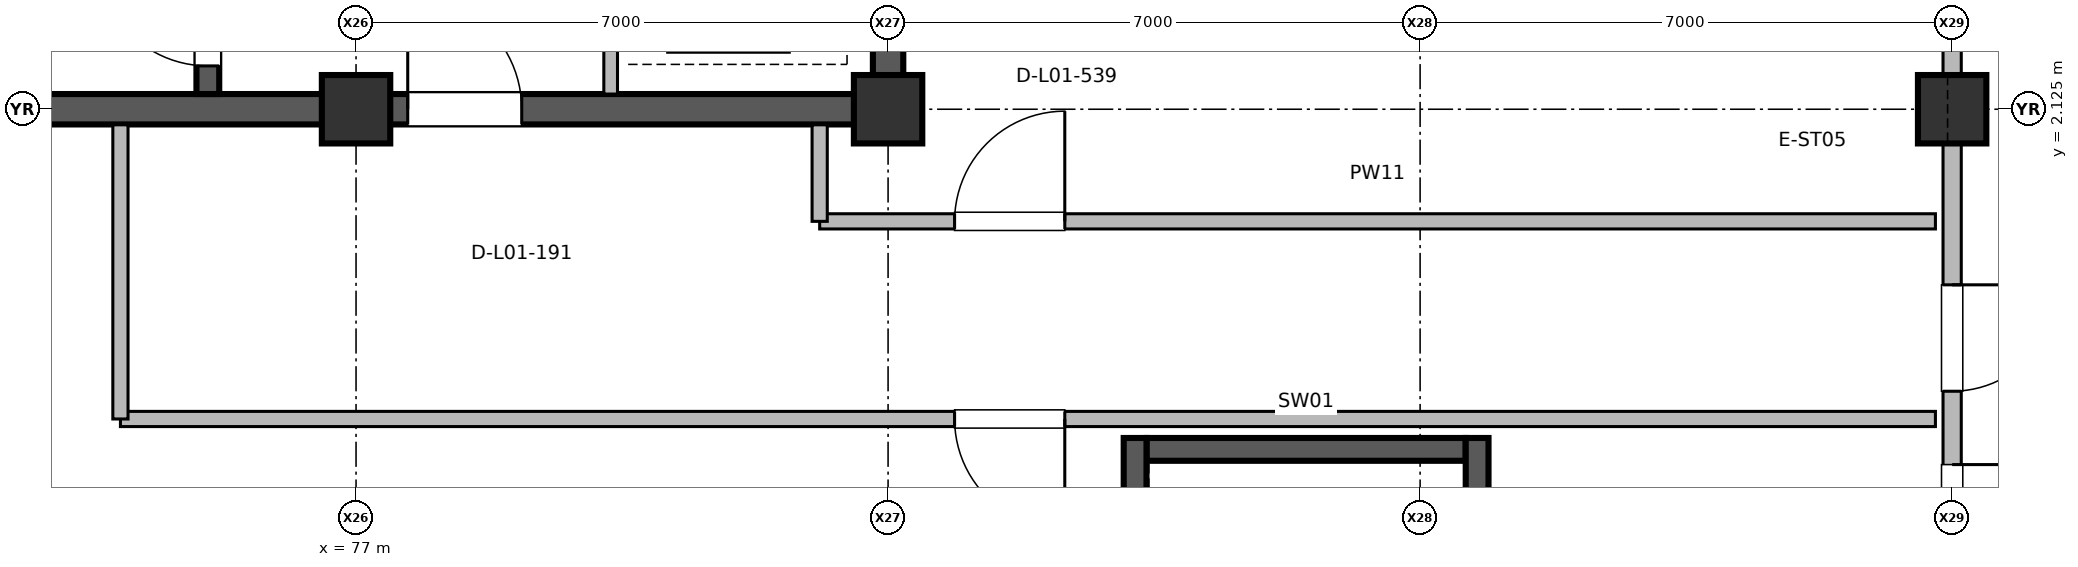
"""IFC4 building model, lengths in metres.
Left out: names, types, materials, properties, quantities, classifications, styles, units other than length and angle.
Written with IfcOpenShell. Run it as: python <this file> out.ifc"""

import sys

from ifc_helpers import new_model, si_unit, direction, frame, frame_2d, origin, origin_2d, place, context, subcontext, project, spatial, rectangle, circle, extrude, element, fill, save


model = new_model("IFC4")
c1 = context("Model", 3, precision=1e-05, world=origin(), true_north=direction((0.0, 1.0)))
c2 = subcontext(c1, "Body", "Model", "MODEL_VIEW")
j1 = project(units=[si_unit("LENGTHUNIT", "METRE"), si_unit("PLANEANGLEUNIT", "RADIAN")], contexts=[c1])
p1 = place(None, origin())
s1 = spatial("IfcSite", under=j1, at=p1, CompositionType="ELEMENT")
p2 = place(p1, origin())
s2 = spatial("IfcBuilding", under=s1, at=p2, CompositionType="ELEMENT")
p3 = place(p2, origin())
s3 = spatial("IfcBuildingStorey", under=s2, at=p3, CompositionType="ELEMENT", Elevation=0.0)
for number, where, z_axis, x_axis in (
    (1, (77.0, 2.125, 0.0), (0.0, 0.0, 1.0), (1.0, 0.0, 0.0)),
    (2, (84.0, 2.125, 0.0), (0.0, 0.0, 1.0), (1.0, 0.0, 0.0)),
):
    element("IfcColumn", number, at=place(p3, frame(where, z_axis=z_axis, x_axis=x_axis)), inside=s3, PredefinedType="COLUMN", context=c2, shape_type="SweptSolid", body=[
        extrude(rectangle(XDim=0.9, YDim=0.9, at=origin_2d()), origin(), (0.0, 0.0, 1.0), 5.998),
    ])
p4 = place(p3, frame((98.0, 2.125, 0.0), z_axis=(0.0, 0.0, 1.0), x_axis=(1.0, 0.0, 0.0)))
e3 = element("IfcColumn", 3, at=p4, inside=s3, PredefinedType="COLUMN", context=c2, shape_type="SweptSolid", body=[
    extrude(circle(Radius=0.45, at=origin_2d()), origin(), (0.0, 0.0, 1.0), 5.998),
])
p5 = place(p3, frame((84.0, 2.325, 0.0), z_axis=(0.0, 0.0, 1.0), x_axis=(0.0, 1.0, 0.0)))
e4 = element("IfcWall", 4, at=p5, inside=s3, PredefinedType="SHEAR", context=c2, shape_type="SweptSolid", body=[
    extrude(rectangle(XDim=13.35, YDim=0.4, at=frame_2d((6.675, 0.0))), origin(), (0.0, 0.0, 1.0), 5.75),
])
p6 = place(p3, frame((70.2, 2.125, 0.0), z_axis=(0.0, 0.0, 1.0), x_axis=(1.0, 0.0, 0.0)))
e5 = element("IfcWall", 5, at=p6, inside=s3, PredefinedType="SHEAR", context=c2, shape_type="SweptSolid", body=[
    extrude(rectangle(XDim=13.6, YDim=0.4, at=frame_2d((6.8, 0.0))), origin(), (0.0, 0.0, 1.0), 5.75),
])
p7 = place(p6, frame((7.48, 0.0, 0.0)))
e6 = element("IfcOpeningElement", 6, at=p7, cuts=e5, PredefinedType="OPENING", context=c2, shape_type="SweptSolid", body=[
    extrude(rectangle(XDim=1.5, YDim=2.2, at=frame_2d((0.75, 1.1))), frame((0.0, 0.21, 0.0), z_axis=(0.0, -1.0, 0.0), x_axis=(1.0, 0.0, 0.0)), (0.0, 0.0, 1.0), 0.42),
])
p8 = place(p3, frame((98.0, 1.685, 0.0), z_axis=(0.0, 0.0, 1.0), x_axis=(0.0, -1.0, 0.0)))
e7 = element("IfcWall", 7, at=p8, inside=s3, PredefinedType="SOLIDWALL", context=c2, shape_type="SweptSolid", body=[
    extrude(rectangle(XDim=12.87, YDim=0.24, at=frame_2d((6.435, 0.0))), origin(), (0.0, 0.0, 1.0), 4.625),
])
p9 = place(p8, frame((4.235, 0.0, 0.0)))
e8 = element("IfcOpeningElement", 8, at=p9, cuts=e7, PredefinedType="OPENING", context=c2, shape_type="SweptSolid", body=[
    extrude(rectangle(XDim=4.4, YDim=2.8, at=frame_2d((2.2, 1.4))), frame((0.0, 0.13, 0.0), z_axis=(0.0, -1.0, 0.0), x_axis=(1.0, 0.0, 0.0)), (0.0, 0.0, 1.0), 0.26),
])
p10 = place(p8, frame((1.87, 0.0, 0.0)))
e9 = element("IfcOpeningElement", 9, at=p10, cuts=e7, PredefinedType="OPENING", context=c2, shape_type="SweptSolid", body=[
    extrude(rectangle(XDim=1.4, YDim=2.2, at=frame_2d((0.7, 1.1))), frame((0.0, 0.13, 0.0), z_axis=(0.0, -1.0, 0.0), x_axis=(1.0, 0.0, 0.0)), (0.0, 0.0, 1.0), 0.26),
])
p11 = place(p8, frame((9.12, 0.0, 1.0)))
e10 = element("IfcOpeningElement", 10, at=p11, cuts=e7, PredefinedType="OPENING", context=c2, shape_type="SweptSolid", body=[
    extrude(rectangle(XDim=3.0, YDim=2.15, at=frame_2d((1.5, 1.075))), frame((0.0, 0.13, 0.0), z_axis=(0.0, -1.0, 0.0), x_axis=(1.0, 0.0, 0.0)), (0.0, 0.0, 1.0), 0.26),
])
p12 = place(p3, frame((98.0, 15.435, 0.0), z_axis=(0.0, 0.0, 1.0), x_axis=(0.0, -1.0, 0.0)))
e11 = element("IfcWall", 11, at=p12, inside=s3, PredefinedType="SOLIDWALL", context=c2, shape_type="SweptSolid", body=[
    extrude(rectangle(XDim=12.87, YDim=0.24, at=frame_2d((6.435, 0.0))), origin(), (0.0, 0.0, 1.0), 4.625),
])
p13 = place(p12, frame((4.635, 0.0, 0.0)))
e12 = element("IfcOpeningElement", 12, at=p13, cuts=e11, PredefinedType="OPENING", context=c2, shape_type="SweptSolid", body=[
    extrude(rectangle(XDim=3.6, YDim=2.75, at=frame_2d((1.8, 1.375))), frame((0.0, 0.13, 0.0), z_axis=(0.0, -1.0, 0.0), x_axis=(1.0, 0.0, 0.0)), (0.0, 0.0, 1.0), 0.26),
])
p14 = place(p12, frame((0.75, 0.0, 1.0)))
e13 = element("IfcOpeningElement", 13, at=p14, cuts=e11, PredefinedType="OPENING", context=c2, shape_type="SweptSolid", body=[
    extrude(rectangle(XDim=1.7, YDim=1.85, at=frame_2d((0.85, 0.925))), frame((0.0, 0.13, 0.0), z_axis=(0.0, -1.0, 0.0), x_axis=(1.0, 0.0, 0.0)), (0.0, 0.0, 1.0), 0.26),
])
p15 = place(p12, frame((10.42, 0.0, 1.0)))
e14 = element("IfcOpeningElement", 14, at=p15, cuts=e11, PredefinedType="OPENING", context=c2, shape_type="SweptSolid", body=[
    extrude(rectangle(XDim=1.7, YDim=1.85, at=frame_2d((0.85, 0.925))), frame((0.0, 0.13, 0.0), z_axis=(0.0, -1.0, 0.0), x_axis=(1.0, 0.0, 0.0)), (0.0, 0.0, 1.0), 0.26),
])
p16 = place(p3, frame((75.05, 2.325, 0.0), z_axis=(0.0, 0.0, 1.0), x_axis=(0.0, 1.0, 0.0)))
e15 = element("IfcWall", 15, at=p16, inside=s3, PredefinedType="SHEAR", context=c2, shape_type="SweptSolid", body=[
    extrude(rectangle(XDim=8.7, YDim=0.3, at=frame_2d((4.35, 0.0))), origin(), (0.0, 0.0, 1.0), 5.75),
])
p17 = place(p16, frame((0.37, 0.0, 0.0)))
e16 = element("IfcOpeningElement", 16, at=p17, cuts=e15, PredefinedType="OPENING", context=c2, shape_type="SweptSolid", body=[
    extrude(rectangle(XDim=1.45, YDim=2.2, at=frame_2d((0.725, 1.1))), frame((0.0, 0.16, 0.0), z_axis=(0.0, -1.0, 0.0), x_axis=(1.0, 0.0, 0.0)), (0.0, 0.0, 1.0), 0.32),
])
p18 = place(p3, frame((80.35, 2.325, 0.0), z_axis=(0.0, 0.0, 1.0), x_axis=(0.0, 1.0, 0.0)))
e17 = element("IfcWall", 17, at=p18, inside=s3, PredefinedType="PARTITIONING", context=c2, shape_type="SweptSolid", body=[
    extrude(rectangle(XDim=7.08, YDim=0.18, at=frame_2d((3.54, 0.0))), origin(), (0.0, 0.0, 1.0), 5.02),
])
p19 = place(p18, frame((1.0, 0.0, 0.0)))
e18 = element("IfcOpeningElement", 18, at=p19, cuts=e17, PredefinedType="OPENING", context=c2, shape_type="SweptSolid", body=[
    extrude(rectangle(XDim=1.1, YDim=2.2, at=frame_2d((0.55, 1.1))), frame((0.0, 0.1, 0.0), z_axis=(0.0, -1.0, 0.0), x_axis=(1.0, 0.0, 0.0)), (0.0, 0.0, 1.0), 0.2),
])
p20 = place(p18, frame((2.85, 0.0, 0.0)))
e19 = element("IfcOpeningElement", 19, at=p20, cuts=e17, PredefinedType="OPENING", context=c2, shape_type="SweptSolid", body=[
    extrude(rectangle(XDim=1.2, YDim=2.25, at=frame_2d((0.6, 1.125))), frame((0.0, 0.1, 0.0), z_axis=(0.0, -1.0, 0.0), x_axis=(1.0, 0.0, 0.0)), (0.0, 0.0, 1.0), 0.2),
])
p21 = place(p18, frame((4.8, 0.0, 0.0)))
e20 = element("IfcOpeningElement", 20, at=p21, cuts=e17, PredefinedType="OPENING", context=c2, shape_type="SweptSolid", body=[
    extrude(rectangle(XDim=1.4, YDim=2.3, at=frame_2d((0.7, 1.15))), frame((0.0, 0.1, 0.0), z_axis=(0.0, -1.0, 0.0), x_axis=(1.0, 0.0, 0.0)), (0.0, 0.0, 1.0), 0.2),
])
p22 = place(p3, frame((97.78, -1.95, 0.0), z_axis=(0.0, 0.0, 1.0), x_axis=(-1.0, 0.0, 0.0)))
e21 = element("IfcWall", 21, at=p22, inside=s3, PredefinedType="PARTITIONING", context=c2, shape_type="SweptSolid", body=[
    extrude(rectangle(XDim=23.88, YDim=0.2, at=frame_2d((11.94, 0.0))), origin(), (0.0, 0.0, 1.0), 4.525),
])
p23 = place(p22, frame((11.455, 0.0, 0.0)))
e22 = element("IfcOpeningElement", 22, at=p23, cuts=e21, PredefinedType="OPENING", context=c2, shape_type="SweptSolid", body=[
    extrude(rectangle(XDim=1.45, YDim=2.2, at=frame_2d((0.725, 1.1))), frame((0.0, 0.11, 0.0), z_axis=(0.0, -1.0, 0.0), x_axis=(1.0, 0.0, 0.0)), (0.0, 0.0, 1.0), 0.22),
])
p24 = place(p3, frame((83.1, 0.65, 0.0), z_axis=(0.0, 0.0, 1.0), x_axis=(1.0, 0.0, 0.0)))
e23 = element("IfcWall", 23, at=p24, inside=s3, PredefinedType="PARTITIONING", context=c2, shape_type="SweptSolid", body=[
    extrude(rectangle(XDim=14.68, YDim=0.2, at=frame_2d((7.34, 0.0))), origin(), (0.0, 0.0, 1.0), 5.02),
])
p25 = place(p24, frame((1.775, 0.0, 0.0)))
e24 = element("IfcOpeningElement", 24, at=p25, cuts=e23, PredefinedType="OPENING", context=c2, shape_type="SweptSolid", body=[
    extrude(rectangle(XDim=1.45, YDim=2.2, at=frame_2d((0.725, 1.1))), frame((0.0, 0.11, 0.0), z_axis=(0.0, -1.0, 0.0), x_axis=(1.0, 0.0, 0.0)), (0.0, 0.0, 1.0), 0.22),
])
p26 = place(p3, frame((83.1, 0.65, 0.0), z_axis=(0.0, 0.0, 1.0), x_axis=(0.0, 1.0, 0.0)))
e25 = element("IfcWall", 25, at=p26, inside=s3, PredefinedType="PARTITIONING", context=c2, shape_type="SweptSolid", body=[
    extrude(rectangle(XDim=1.27, YDim=0.2, at=frame_2d((0.635, 0.0))), origin(), (0.0, 0.0, 1.0), 5.02),
])
p27 = place(p3, frame((73.9, -1.95, 0.0), z_axis=(0.0, 0.0, 1.0), x_axis=(0.0, 1.0, 0.0)))
e26 = element("IfcWall", 26, at=p27, inside=s3, PredefinedType="PARTITIONING", context=c2, shape_type="SweptSolid", body=[
    extrude(rectangle(XDim=3.87, YDim=0.2, at=frame_2d((1.935, 0.0))), origin(), (0.0, 0.0, 1.0), 5.02),
])
p28 = place(p3, frame((87.4, -2.35, 0.0), z_axis=(0.0, 0.0, 1.0), x_axis=(1.0, 0.0, 0.0)))
e27 = element("IfcWall", 27, at=p28, inside=s3, PredefinedType="SHEAR", context=c2, shape_type="SweptSolid", body=[
    extrude(rectangle(XDim=4.2, YDim=0.3, at=frame_2d((2.1, 0.0))), origin(), (0.0, 0.0, 1.0), 5.75),
])
for number, where, z_axis, x_axis in (
    (28, (87.25, -10.65, 0.0), (0.0, 0.0, 1.0), (0.0, 1.0, 0.0)),
    (29, (91.75, -10.65, 0.0), (0.0, 0.0, 1.0), (0.0, 1.0, 0.0)),
):
    element("IfcWall", number, at=place(p3, frame(where, z_axis=z_axis, x_axis=x_axis)), inside=s3, PredefinedType="SHEAR", context=c2, shape_type="SweptSolid", body=[
        extrude(rectangle(XDim=8.45, YDim=0.3, at=frame_2d((4.225, 0.0))), origin(), (0.0, 0.0, 1.0), 5.75),
    ])
p29 = place(p9, origin())
e30 = element("IfcDoor", 30, at=p29, inside=s3, OperationType="DOUBLE_DOOR_SINGLE_SWING", PredefinedType="DOOR", context=c2, shape_type="SweptSolid", body=[
    extrude(rectangle(XDim=4.4, YDim=2.8, at=frame_2d((2.2, 1.4))), frame((0.0, 0.025, 0.0), z_axis=(0.0, -1.0, 0.0), x_axis=(1.0, 0.0, 0.0)), (0.0, 0.0, 1.0), 0.05),
])
fill(e8, e30)
p30 = place(p10, origin())
e31 = element("IfcDoor", 31, at=p30, inside=s3, OperationType="SINGLE_SWING_LEFT", PredefinedType="DOOR", context=c2, shape_type="SweptSolid", body=[
    extrude(rectangle(XDim=1.4, YDim=2.2, at=frame_2d((0.7, 1.1))), frame((0.0, 0.025, 0.0), z_axis=(0.0, -1.0, 0.0), x_axis=(1.0, 0.0, 0.0)), (0.0, 0.0, 1.0), 0.05),
])
fill(e9, e31)
p31 = place(p7, origin())
e32 = element("IfcDoor", 32, at=p31, inside=s3, OperationType="SINGLE_SWING_LEFT", PredefinedType="DOOR", context=c2, shape_type="SweptSolid", body=[
    extrude(rectangle(XDim=1.5, YDim=2.2, at=frame_2d((0.75, 1.1))), frame((0.0, 0.025, 0.0), z_axis=(0.0, -1.0, 0.0), x_axis=(1.0, 0.0, 0.0)), (0.0, 0.0, 1.0), 0.05),
])
fill(e6, e32)
p32 = place(p17, origin())
e33 = element("IfcDoor", 33, at=p32, inside=s3, OperationType="SINGLE_SWING_RIGHT", PredefinedType="DOOR", context=c2, shape_type="SweptSolid", body=[
    extrude(rectangle(XDim=1.45, YDim=2.2, at=frame_2d((0.725, 1.1))), frame((0.0, 0.025, 0.0), z_axis=(0.0, -1.0, 0.0), x_axis=(1.0, 0.0, 0.0)), (0.0, 0.0, 1.0), 0.05),
])
fill(e16, e33)
p33 = place(p23, origin())
e34 = element("IfcDoor", 34, at=p33, inside=s3, OperationType="SINGLE_SWING_LEFT", PredefinedType="DOOR", context=c2, shape_type="SweptSolid", body=[
    extrude(rectangle(XDim=1.45, YDim=2.2, at=frame_2d((0.725, 1.1))), frame((0.0, 0.025, 0.0), z_axis=(0.0, -1.0, 0.0), x_axis=(1.0, 0.0, 0.0)), (0.0, 0.0, 1.0), 0.05),
])
fill(e22, e34)
p34 = place(p25, origin())
e35 = element("IfcDoor", 35, at=p34, inside=s3, OperationType="SINGLE_SWING_RIGHT", PredefinedType="DOOR", context=c2, shape_type="SweptSolid", body=[
    extrude(rectangle(XDim=1.45, YDim=2.2, at=frame_2d((0.725, 1.1))), frame((0.0, 0.025, 0.0), z_axis=(0.0, -1.0, 0.0), x_axis=(1.0, 0.0, 0.0)), (0.0, 0.0, 1.0), 0.05),
])
fill(e24, e35)
save(model, sys.argv[1])
